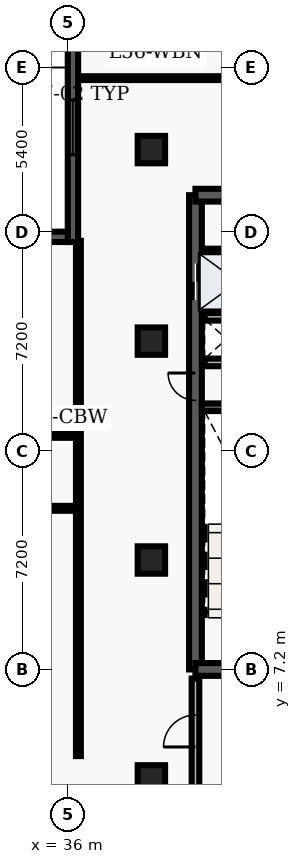
"""IFC4 building model, lengths in metres.
Left out: names, types, materials, properties, quantities, classifications, styles, units other than length and angle.
Written with IfcOpenShell. Run it as: python <this file> out.ifc"""

import sys

from ifc_helpers import new_model, entity, si_unit, converted_unit, direction, frame, origin_with_axes, origin_2d_with_axis, place, context, subcontext, project, spatial, polyline, rectangle, outline, extrude, element, fill, save


model = new_model("IFC4")
c1 = context("Model", 3, precision=1e-05, world=origin_with_axes(), true_north=direction((0.0, 1.0)))
c2 = subcontext(c1, "Body", "Model", "MODEL_VIEW")
j1 = project(units=[si_unit("LENGTHUNIT", "METRE"), converted_unit("PLANEANGLEUNIT", "DEGREE", entity("IfcPlaneAngleMeasure", 0.017), si_unit("PLANEANGLEUNIT", "RADIAN"), dimensions=[0, 0, 0, 0, 0, 0, 0])], contexts=[c1])
p1 = place(None, origin_with_axes())
s1 = spatial("IfcSite", under=j1, at=p1, CompositionType="ELEMENT")
p2 = place(p1, origin_with_axes())
s2 = spatial("IfcBuilding", under=s1, at=p2, CompositionType="ELEMENT")
p3 = place(p2, frame((0.0, 0.0, 228.6), z_axis=(0.0, 0.0, 1.0), x_axis=(1.0, 0.0, 0.0)))
s3 = spatial("IfcBuildingStorey", under=s2, at=p3, CompositionType="ELEMENT", Elevation=228.6)
p4 = place(p3, frame((40.2, 7.2, 0.0), z_axis=(0.0, 0.0, 1.0), x_axis=(0.0, 1.0, 0.0)))
e1 = element("IfcWall", 1, at=p4, inside=s3, PredefinedType="SHEAR", context=c2, shape_type="SweptSolid", body=[
    extrude(outline(polyline([(0.0, -0.21), (15.6, -0.21), (15.6, 0.21), (0.0, 0.21), (0.0, -0.21)])), origin_with_axes(), (0.0, 0.0, 1.0), 3.66),
])
p5 = place(p4, frame((12.75, 0.0, 0.0), z_axis=(0.0, 0.0, 1.0), x_axis=(1.0, 0.0, 0.0)))
e2 = element("IfcOpeningElement", 2, at=p5, cuts=e1, PredefinedType="OPENING", context=c2, shape_type="SweptSolid", body=[
    extrude(rectangle(XDim=1.2, YDim=0.44, at=origin_2d_with_axis()), origin_with_axes(), (0.0, 0.0, 1.0), 2.15),
])
p6 = place(p4, frame((9.3, 0.0, 0.0), z_axis=(0.0, 0.0, 1.0), x_axis=(1.0, 0.0, 0.0)))
e3 = element("IfcOpeningElement", 3, at=p6, cuts=e1, PredefinedType="OPENING", context=c2, shape_type="SweptSolid", body=[
    extrude(rectangle(XDim=0.9, YDim=0.44, at=origin_2d_with_axis()), origin_with_axes(), (0.0, 0.0, 1.0), 2.15),
])
p7 = place(p3, frame((40.2, 7.2, 0.0), z_axis=(0.0, 0.0, 1.0), x_axis=(1.0, 0.0, 0.0)))
e4 = element("IfcWall", 4, at=p7, inside=s3, PredefinedType="SHEAR", context=c2, shape_type="SweptSolid", body=[
    extrude(outline(polyline([(0.0, -0.21), (7.85, -0.21), (7.85, 0.21), (0.0, 0.21), (0.0, -0.21)])), origin_with_axes(), (0.0, 0.0, 1.0), 3.66),
])
p8 = place(p7, frame((2.175, 0.0, 0.0), z_axis=(0.0, 0.0, 1.0), x_axis=(1.0, 0.0, 0.0)))
e5 = element("IfcOpeningElement", 5, at=p8, cuts=e4, PredefinedType="OPENING", context=c2, shape_type="SweptSolid", body=[
    extrude(rectangle(XDim=1.05, YDim=0.44, at=origin_2d_with_axis()), origin_with_axes(), (0.0, 0.0, 1.0), 2.15),
])
p9 = place(p3, frame((40.2, 22.8, 0.0), z_axis=(0.0, 0.0, 1.0), x_axis=(1.0, 0.0, 0.0)))
e6 = element("IfcWall", 6, at=p9, inside=s3, PredefinedType="SHEAR", context=c2, shape_type="SweptSolid", body=[
    extrude(outline(polyline([(0.0, -0.21), (7.85, -0.21), (7.85, 0.21), (0.0, 0.21), (0.0, -0.21)])), origin_with_axes(), (0.0, 0.0, 1.0), 3.66),
])
p10 = place(p9, frame((5.775, 0.0, 0.0), z_axis=(0.0, 0.0, 1.0), x_axis=(1.0, 0.0, 0.0)))
e7 = element("IfcOpeningElement", 7, at=p10, cuts=e6, PredefinedType="OPENING", context=c2, shape_type="SweptSolid", body=[
    extrude(rectangle(XDim=1.05, YDim=0.44, at=origin_2d_with_axis()), origin_with_axes(), (0.0, 0.0, 1.0), 2.15),
])
p11 = place(p9, frame((2.15, 0.0, 0.0), z_axis=(0.0, 0.0, 1.0), x_axis=(1.0, 0.0, 0.0)))
e8 = element("IfcOpeningElement", 8, at=p11, cuts=e6, PredefinedType="OPENING", context=c2, shape_type="SweptSolid", body=[
    extrude(rectangle(XDim=0.9, YDim=0.44, at=origin_2d_with_axis()), origin_with_axes(), (0.0, 0.0, 1.0), 2.15),
])
p12 = place(p3, frame((40.41, 15.825, 0.0), z_axis=(0.0, 0.0, 1.0), x_axis=(1.0, 0.0, 0.0)))
e9 = element("IfcWall", 9, at=p12, inside=s3, PredefinedType="SHEAR", context=c2, shape_type="SweptSolid", body=[
    extrude(outline(polyline([(0.0, -0.125), (3.59, -0.125), (3.59, 0.125), (0.0, 0.125), (0.0, -0.125)])), origin_with_axes(), (0.0, 0.0, 1.0), 3.66),
])
p13 = place(p3, frame((40.5, 17.3, 0.0), z_axis=(0.0, 0.0, 1.0), x_axis=(1.0, 0.0, 0.0)))
e10 = element("IfcWall", 10, at=p13, inside=s3, PredefinedType="SOLIDWALL", context=c2, shape_type="SweptSolid", body=[
    extrude(outline(polyline([(0.0, -0.125), (3.5, -0.125), (3.5, 0.125), (0.0, 0.125), (0.0, -0.125)])), origin_with_axes(), (0.0, 0.0, 1.0), 2.7),
])
p14 = place(p13, frame((2.4, 0.0, 0.0), z_axis=(0.0, 0.0, 1.0), x_axis=(1.0, 0.0, 0.0)))
e11 = element("IfcOpeningElement", 11, at=p14, cuts=e10, PredefinedType="OPENING", context=c2, shape_type="SweptSolid", body=[
    extrude(rectangle(XDim=0.9, YDim=0.27, at=origin_2d_with_axis()), origin_with_axes(), (0.0, 0.0, 1.0), 2.15),
])
p15 = place(p3, frame((40.5, 18.8, 0.0), z_axis=(0.0, 0.0, 1.0), x_axis=(1.0, 0.0, 0.0)))
e12 = element("IfcWall", 12, at=p15, inside=s3, PredefinedType="SOLIDWALL", context=c2, shape_type="SweptSolid", body=[
    extrude(outline(polyline([(0.0, -0.125), (3.5, -0.125), (3.5, 0.125), (0.0, 0.125), (0.0, -0.125)])), origin_with_axes(), (0.0, 0.0, 1.0), 2.7),
])
p16 = place(p3, frame((40.2, 3.1, 0.0), z_axis=(0.0, 0.0, 1.0), x_axis=(0.0, 1.0, 0.0)))
e13 = element("IfcWall", 13, at=p16, inside=s3, PredefinedType="SOLIDWALL", context=c2, shape_type="SweptSolid", body=[
    extrude(outline(polyline([(0.0, -0.125), (3.8, -0.125), (3.8, 0.125), (0.0, 0.125), (0.0, -0.125)])), origin_with_axes(), (0.0, 0.0, 1.0), 2.7),
])
p17 = place(p16, frame((2.075, 0.0, 0.0), z_axis=(0.0, 0.0, 1.0), x_axis=(1.0, 0.0, 0.0)))
e14 = element("IfcOpeningElement", 14, at=p17, cuts=e13, PredefinedType="OPENING", context=c2, shape_type="SweptSolid", body=[
    extrude(rectangle(XDim=1.05, YDim=0.27, at=origin_2d_with_axis()), origin_with_axes(), (0.0, 0.0, 1.0), 2.15),
])
for number, where, z_axis, x_axis in (
    (15, (38.75, 3.6, 0.0), (0.0, 0.0, 1.0), (1.0, 0.0, 0.0)),
    (16, (38.75, 10.8, 0.0), (0.0, 0.0, 1.0), (1.0, 0.0, 0.0)),
    (17, (38.75, 18.0, 0.0), (0.0, 0.0, 1.0), (1.0, 0.0, 0.0)),
    (18, (38.75, 24.3, 0.0), (0.0, 0.0, 1.0), (1.0, 0.0, 0.0)),
):
    element("IfcColumn", number, at=place(p3, frame(where, z_axis=z_axis, x_axis=x_axis)), inside=s3, PredefinedType="COLUMN", context=c2, shape_type="SweptSolid", body=[
        extrude(rectangle(XDim=0.9, YDim=0.9, at=origin_2d_with_axis()), origin_with_axes(), (0.0, 0.0, 1.0), 3.9),
    ])
p18 = place(p3, frame((40.5, 20.96, 0.0), z_axis=(0.0, 0.0, 1.0), x_axis=(1.0, 0.0, 0.0)))
e19 = element("IfcWall", 19, at=p18, inside=s3, PredefinedType="PARTITIONING", context=c2, shape_type="SweptSolid", body=[
    extrude(outline(polyline([(0.0, -0.08), (3.5, -0.08), (3.5, 0.08), (0.0, 0.08), (0.0, -0.08)])), origin_with_axes(), (0.0, 0.0, 1.0), 2.7),
])
p19 = place(p3, frame((20.3, 12.5, 0.0), z_axis=(0.0, 0.0, 1.0), x_axis=(1.0, 0.0, 0.0)))
e20 = element("IfcWall", 20, at=p19, inside=s3, PredefinedType="PARTITIONING", context=c2, shape_type="SweptSolid", body=[
    extrude(outline(polyline([(0.0, -0.08), (16.05, -0.08), (16.05, 0.08), (0.0, 0.08), (0.0, -0.08)])), origin_with_axes(), (0.0, 0.0, 1.0), 2.7),
])
p20 = place(p19, frame((3.865, 0.0, 0.0), z_axis=(0.0, 0.0, 1.0), x_axis=(1.0, 0.0, 0.0)))
e21 = element("IfcOpeningElement", 21, at=p20, cuts=e20, PredefinedType="OPENING", context=c2, shape_type="SweptSolid", body=[
    extrude(rectangle(XDim=1.2, YDim=0.18, at=origin_2d_with_axis()), origin_with_axes(), (0.0, 0.0, 1.0), 2.2),
])
p21 = place(p19, frame((9.48, 0.0, 0.0), z_axis=(0.0, 0.0, 1.0), x_axis=(1.0, 0.0, 0.0)))
e22 = element("IfcOpeningElement", 22, at=p21, cuts=e20, PredefinedType="OPENING", context=c2, shape_type="SweptSolid", body=[
    extrude(rectangle(XDim=1.0, YDim=0.18, at=origin_2d_with_axis()), origin_with_axes(), (0.0, 0.0, 1.0), 2.15),
])
p22 = place(p19, frame((13.691, 0.0, 0.0), z_axis=(0.0, 0.0, 1.0), x_axis=(1.0, 0.0, 0.0)))
e23 = element("IfcOpeningElement", 23, at=p22, cuts=e20, PredefinedType="OPENING", context=c2, shape_type="SweptSolid", body=[
    extrude(rectangle(XDim=1.0, YDim=0.18, at=origin_2d_with_axis()), origin_with_axes(), (0.0, 0.0, 1.0), 2.15),
])
p23 = place(p3, frame((20.3, 14.9, 0.0), z_axis=(0.0, 0.0, 1.0), x_axis=(1.0, 0.0, 0.0)))
e24 = element("IfcWall", 24, at=p23, inside=s3, PredefinedType="PARTITIONING", context=c2, shape_type="SweptSolid", body=[
    extrude(outline(polyline([(0.0, -0.08), (16.05, -0.08), (16.05, 0.08), (0.0, 0.08), (0.0, -0.08)])), origin_with_axes(), (0.0, 0.0, 1.0), 2.7),
])
p24 = place(p23, frame((8.075, 0.0, 0.0), z_axis=(0.0, 0.0, 1.0), x_axis=(1.0, 0.0, 0.0)))
e25 = element("IfcOpeningElement", 25, at=p24, cuts=e24, PredefinedType="OPENING", context=c2, shape_type="SweptSolid", body=[
    extrude(rectangle(XDim=1.2, YDim=0.18, at=origin_2d_with_axis()), origin_with_axes(), (0.0, 0.0, 1.0), 2.2),
])
p25 = place(p3, frame((36.35, 4.35, 0.0), z_axis=(0.0, 0.0, 1.0), x_axis=(0.0, 1.0, 0.0)))
e26 = element("IfcWall", 26, at=p25, inside=s3, PredefinedType="PARTITIONING", context=c2, shape_type="SweptSolid", body=[
    extrude(outline(polyline([(0.0, -0.08), (16.95, -0.08), (16.95, 0.08), (0.0, 0.08), (0.0, -0.08)])), origin_with_axes(), (0.0, 0.0, 1.0), 2.7),
])
p26 = place(p3, frame((36.335, 26.65, 0.0), z_axis=(0.0, 0.0, 1.0), x_axis=(1.0, 0.0, 0.0)))
e27 = element("IfcWall", 27, at=p26, inside=s3, PredefinedType="PARTITIONING", context=c2, shape_type="SweptSolid", body=[
    extrude(outline(polyline([(0.0, -0.062), (11.195, -0.062), (11.195, 0.062), (0.0, 0.062), (0.0, -0.062)])), origin_with_axes(), (0.0, 0.0, 1.0), 2.7),
])
p27 = place(p26, frame((6.665, 0.0, 0.0), z_axis=(0.0, 0.0, 1.0), x_axis=(1.0, 0.0, 0.0)))
e28 = element("IfcOpeningElement", 28, at=p27, cuts=e27, PredefinedType="OPENING", context=c2, shape_type="SweptSolid", body=[
    extrude(rectangle(XDim=1.0, YDim=0.145, at=origin_2d_with_axis()), origin_with_axes(), (0.0, 0.0, 1.0), 2.15),
])
p28 = place(p3, frame((36.17, 21.26, 0.0), z_axis=(0.0, 0.0, 1.0), x_axis=(0.0, 1.0, 0.0)))
e29 = element("IfcWall", 29, at=p28, inside=s3, PredefinedType="SOLIDWALL", context=c2, shape_type="SweptSolid", body=[
    extrude(outline(polyline([(0.0, -0.17), (7.54, -0.17), (7.54, 0.17), (0.0, 0.17), (0.0, -0.17)])), origin_with_axes(), (0.0, 0.0, 1.0), 3.66),
])
p29 = place(p28, frame((3.77, 0.0, 0.45), z_axis=(0.0, 0.0, 1.0), x_axis=(1.0, 0.0, 0.0)))
e30 = element("IfcOpeningElement", 30, at=p29, cuts=e29, PredefinedType="OPENING", context=c2, shape_type="SweptSolid", body=[
    extrude(rectangle(XDim=1.8, YDim=0.36, at=origin_2d_with_axis()), origin_with_axes(), (0.0, 0.0, 1.0), 2.1),
])
p30 = place(p3, frame((32.06, 21.43, 0.0), z_axis=(0.0, 0.0, 1.0), x_axis=(1.0, 0.0, 0.0)))
e31 = element("IfcWall", 31, at=p30, inside=s3, PredefinedType="SOLIDWALL", context=c2, shape_type="SweptSolid", body=[
    extrude(outline(polyline([(0.0, -0.17), (3.94, -0.17), (3.94, 0.17), (0.0, 0.17), (0.0, -0.17)])), origin_with_axes(), (0.0, 0.0, 1.0), 3.66),
])
p31 = place(p4, frame((12.75, 0.0, 0.0), z_axis=(0.0, 0.0, 1.0), x_axis=(1.0, 0.0, 0.0)))
e32 = element("IfcDoor", 32, at=p31, inside=s3, OperationType="DOUBLE_DOOR_SLIDING", PredefinedType="DOOR", context=c2, shape_type="SweptSolid", body=[
    extrude(rectangle(XDim=1.2, YDim=0.09, at=origin_2d_with_axis()), origin_with_axes(), (0.0, 0.0, 1.0), 2.15),
])
fill(e2, e32)
p32 = place(p4, frame((9.3, 0.0, 0.0), z_axis=(0.0, 0.0, 1.0), x_axis=(1.0, 0.0, 0.0)))
e33 = element("IfcDoor", 33, at=p32, inside=s3, OperationType="SINGLE_SWING_RIGHT", PredefinedType="DOOR", context=c2, shape_type="SweptSolid", body=[
    extrude(rectangle(XDim=0.9, YDim=0.09, at=origin_2d_with_axis()), origin_with_axes(), (0.0, 0.0, 1.0), 2.15),
])
fill(e3, e33)
p33 = place(p16, frame((2.075, 0.0, 0.0), z_axis=(0.0, 0.0, 1.0), x_axis=(1.0, 0.0, 0.0)))
e34 = element("IfcDoor", 34, at=p33, inside=s3, OperationType="SINGLE_SWING_LEFT", PredefinedType="DOOR", context=c2, shape_type="SweptSolid", body=[
    extrude(rectangle(XDim=1.05, YDim=0.09, at=origin_2d_with_axis()), origin_with_axes(), (0.0, 0.0, 1.0), 2.15),
])
fill(e14, e34)
p34 = place(p28, frame((3.77, 0.0, 0.45), z_axis=(0.0, 0.0, 1.0), x_axis=(1.0, 0.0, 0.0)))
e35 = element("IfcWindow", 35, at=p34, inside=s3, PredefinedType="WINDOW", context=c2, shape_type="SweptSolid", body=[
    extrude(rectangle(XDim=1.8, YDim=0.09, at=origin_2d_with_axis()), origin_with_axes(), (0.0, 0.0, 1.0), 2.1),
])
fill(e30, e35)
save(model, sys.argv[1])
